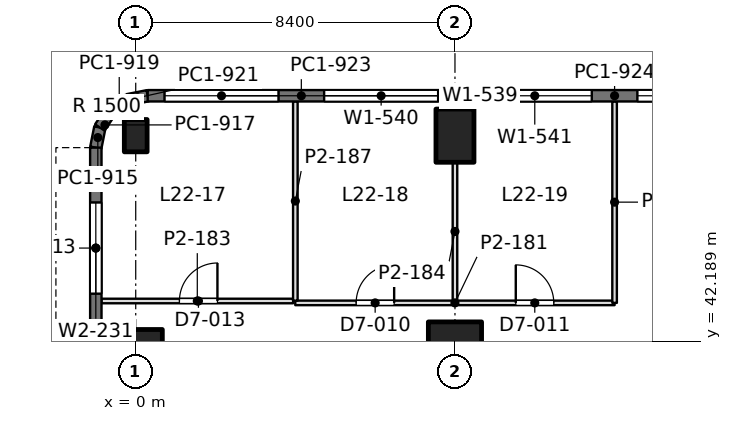
"""IFC4 building model, lengths in metres.
Left out: names, types, materials, properties, quantities, classifications, styles, units other than length and angle.
Written with IfcOpenShell. Run it as: python <this file> out.ifc"""

import sys

from ifc_helpers import new_model, si_unit, direction, frame, frame_2d, origin, origin_2d, place, context, subcontext, project, spatial, rectangle, extrude, element, fill, save


model = new_model("IFC4")
c1 = context("Model", 3, precision=1e-05, world=origin(), true_north=direction((0.0, 1.0)))
c2 = subcontext(c1, "Body", "Model", "MODEL_VIEW")
j1 = project(units=[si_unit("LENGTHUNIT", "METRE"), si_unit("PLANEANGLEUNIT", "RADIAN")], contexts=[c1])
p1 = place(None, origin())
s1 = spatial("IfcSite", under=j1, at=p1, CompositionType="ELEMENT")
p2 = place(p1, origin())
s2 = spatial("IfcBuilding", under=s1, at=p2, CompositionType="ELEMENT")
p3 = place(p2, frame((0.0, 0.0, 100.8)))
s3 = spatial("IfcBuildingStorey", under=s2, at=p3, CompositionType="ELEMENT", Elevation=100.8)
p4 = place(p3, frame((0.0, 42.0, 0.0), z_axis=(0.0, 0.0, 1.0), x_axis=(0.0, 1.0, 0.0)))
e1 = element("IfcColumn", 1, at=p4, inside=s3, PredefinedType="COLUMN", context=c2, shape_type="SweptSolid", body=[
    extrude(rectangle(XDim=1.0, YDim=1.4, at=origin_2d()), origin(), (0.0, 0.0, 1.0), 4.2),
])
p5 = place(p3, frame((0.0, 47.6, 0.0), z_axis=(0.0, 0.0, 1.0), x_axis=(1.0, 0.0, 0.0)))
e2 = element("IfcColumn", 2, at=p5, inside=s3, PredefinedType="COLUMN", context=c2, shape_type="SweptSolid", body=[
    extrude(rectangle(XDim=0.6, YDim=0.85, at=origin_2d()), origin(), (0.0, 0.0, 1.0), 4.2),
])
p6 = place(p3, frame((8.4, 42.0, 0.0), z_axis=(0.0, 0.0, 1.0), x_axis=(1.0, 0.0, 0.0)))
e3 = element("IfcColumn", 3, at=p6, inside=s3, PredefinedType="COLUMN", context=c2, shape_type="SweptSolid", body=[
    extrude(rectangle(XDim=1.4, YDim=1.4, at=origin_2d()), origin(), (0.0, 0.0, 1.0), 4.2),
])
p7 = place(p3, frame((8.4, 47.6, 0.0), z_axis=(0.0, 0.0, 1.0), x_axis=(1.0, 0.0, 0.0)))
e4 = element("IfcColumn", 4, at=p7, inside=s3, PredefinedType="COLUMN", context=c2, shape_type="SweptSolid", body=[
    extrude(rectangle(XDim=1.0, YDim=1.4, at=origin_2d()), origin(), (0.0, 0.0, 1.0), 4.2),
])
p8 = place(p3, frame((-1.05, 42.0, 0.0), z_axis=(0.0, 0.0, 1.0), x_axis=(0.0, 1.0, 0.0)))
e5 = element("IfcWall", 5, at=p8, inside=s3, PredefinedType="SOLIDWALL", context=c2, shape_type="SweptSolid", body=[
    extrude(rectangle(XDim=5.285, YDim=0.3, at=frame_2d((2.643, 0.0))), origin(), (0.0, 0.0, 1.0), 4.05),
])
p9 = place(p8, frame((1.443, 0.0, 0.9)))
e6 = element("IfcOpeningElement", 6, at=p9, cuts=e5, PredefinedType="OPENING", context=c2, shape_type="SweptSolid", body=[
    extrude(rectangle(XDim=2.4, YDim=1.9, at=frame_2d((1.2, 0.95))), frame((0.0, 0.16, 0.0), z_axis=(0.0, -1.0, 0.0), x_axis=(1.0, 0.0, 0.0)), (0.0, 0.0, 1.0), 0.32),
])
p10 = place(p3, frame((-1.05, 47.285, 0.0), z_axis=(0.0, 0.0, 1.0), x_axis=(0.195073962632, 0.980788534345, 0.0)))
e7 = element("IfcWall", 7, at=p10, inside=s3, PredefinedType="SOLIDWALL", context=c2, shape_type="SweptSolid", body=[
    extrude(rectangle(XDim=0.541, YDim=0.3, at=frame_2d((0.271, 0.0))), origin(), (0.0, 0.0, 1.0), 4.05),
])
p11 = place(p3, frame((-0.945, 47.815, 0.0), z_axis=(0.0, 0.0, 1.0), x_axis=(0.55534295404, 0.831621430339, 0.0)))
e8 = element("IfcWall", 8, at=p11, inside=s3, PredefinedType="SOLIDWALL", context=c2, shape_type="SweptSolid", body=[
    extrude(rectangle(XDim=0.526, YDim=0.3, at=frame_2d((0.263, 0.0))), origin(), (0.0, 0.0, 1.0), 4.05),
])
p12 = place(p3, frame((-0.653, 48.253, 0.0), z_axis=(0.0, 0.0, 1.0), x_axis=(0.831692711774, 0.555236195849, 0.0)))
e9 = element("IfcWall", 9, at=p12, inside=s3, PredefinedType="SOLIDWALL", context=c2, shape_type="SweptSolid", body=[
    extrude(rectangle(XDim=0.525, YDim=0.3, at=frame_2d((0.263, 0.0))), origin(), (0.0, 0.0, 1.0), 4.05),
])
p13 = place(p3, frame((-0.216, 48.544, 0.0), z_axis=(0.0, 0.0, 1.0), x_axis=(0.980788534345, 0.195073962632, 0.0)))
e10 = element("IfcWall", 10, at=p13, inside=s3, PredefinedType="SOLIDWALL", context=c2, shape_type="SweptSolid", body=[
    extrude(rectangle(XDim=0.541, YDim=0.3, at=frame_2d((0.271, 0.0))), origin(), (0.0, 0.0, 1.0), 4.05),
])
p14 = place(p3, frame((0.315, 48.65, 0.0), z_axis=(0.0, 0.0, 1.0), x_axis=(1.0, 0.0, 0.0)))
e11 = element("IfcWall", 11, at=p14, inside=s3, PredefinedType="SOLIDWALL", context=c2, shape_type="SweptSolid", body=[
    extrude(rectangle(XDim=8.085, YDim=0.3, at=frame_2d((4.042, 0.0))), origin(), (0.0, 0.0, 1.0), 4.05),
])
p15 = place(p14, frame((0.443, 0.0, 0.9)))
e12 = element("IfcOpeningElement", 12, at=p15, cuts=e11, PredefinedType="OPENING", context=c2, shape_type="SweptSolid", body=[
    extrude(rectangle(XDim=3.0, YDim=1.9, at=frame_2d((1.5, 0.95))), frame((0.0, 0.16, 0.0), z_axis=(0.0, -1.0, 0.0), x_axis=(1.0, 0.0, 0.0)), (0.0, 0.0, 1.0), 0.32),
])
p16 = place(p14, frame((4.643, 0.0, 0.9)))
e13 = element("IfcOpeningElement", 13, at=p16, cuts=e11, PredefinedType="OPENING", context=c2, shape_type="SweptSolid", body=[
    extrude(rectangle(XDim=3.0, YDim=1.9, at=frame_2d((1.5, 0.95))), frame((0.0, 0.16, 0.0), z_axis=(0.0, -1.0, 0.0), x_axis=(1.0, 0.0, 0.0)), (0.0, 0.0, 1.0), 0.32),
])
p17 = place(p3, frame((8.4, 48.65, 0.0), z_axis=(0.0, 0.0, 1.0), x_axis=(1.0, 0.0, 0.0)))
e14 = element("IfcWall", 14, at=p17, inside=s3, PredefinedType="SOLIDWALL", context=c2, shape_type="SweptSolid", body=[
    extrude(rectangle(XDim=8.4, YDim=0.3, at=frame_2d((4.2, 0.0))), origin(), (0.0, 0.0, 1.0), 4.05),
])
p18 = place(p17, frame((0.6, 0.0, 0.9)))
e15 = element("IfcOpeningElement", 15, at=p18, cuts=e14, PredefinedType="OPENING", context=c2, shape_type="SweptSolid", body=[
    extrude(rectangle(XDim=3.0, YDim=1.9, at=frame_2d((1.5, 0.95))), frame((0.0, 0.16, 0.0), z_axis=(0.0, -1.0, 0.0), x_axis=(1.0, 0.0, 0.0)), (0.0, 0.0, 1.0), 0.32),
])
p19 = place(p17, frame((4.8, 0.0, 0.9)))
e16 = element("IfcOpeningElement", 16, at=p19, cuts=e14, PredefinedType="OPENING", context=c2, shape_type="SweptSolid", body=[
    extrude(rectangle(XDim=3.0, YDim=1.9, at=frame_2d((1.5, 0.95))), frame((0.0, 0.16, 0.0), z_axis=(0.0, -1.0, 0.0), x_axis=(1.0, 0.0, 0.0)), (0.0, 0.0, 1.0), 0.32),
])
p20 = place(p3, frame((-0.902, 43.25, 0.0), z_axis=(0.0, 0.0, 1.0), x_axis=(1.0, 0.0, 0.0)))
e17 = element("IfcWall", 17, at=p20, inside=s3, PredefinedType="PARTITIONING", context=c2, shape_type="SweptSolid", body=[
    extrude(rectangle(XDim=5.044, YDim=0.12, at=frame_2d((2.522, 0.0))), origin(), (0.0, 0.0, 1.0), 3.56),
])
p21 = place(p20, frame((2.052, 0.0, 0.0)))
e18 = element("IfcOpeningElement", 18, at=p21, cuts=e17, PredefinedType="OPENING", context=c2, shape_type="SweptSolid", body=[
    extrude(rectangle(XDim=1.0, YDim=2.4, at=frame_2d((0.5, 1.2))), frame((0.0, 0.07, 0.0), z_axis=(0.0, -1.0, 0.0), x_axis=(1.0, 0.0, 0.0)), (0.0, 0.0, 1.0), 0.14),
])
p22 = place(p3, frame((4.198, 43.2, 0.0), z_axis=(0.0, 0.0, 1.0), x_axis=(1.0, 0.0, 0.0)))
e19 = element("IfcWall", 19, at=p22, inside=s3, PredefinedType="PARTITIONING", context=c2, shape_type="SweptSolid", body=[
    extrude(rectangle(XDim=8.402, YDim=0.12, at=frame_2d((4.201, 0.0))), origin(), (0.0, 0.0, 1.0), 3.55),
])
p23 = place(p22, frame((1.602, 0.0, 0.0)))
e20 = element("IfcOpeningElement", 20, at=p23, cuts=e19, PredefinedType="OPENING", context=c2, shape_type="SweptSolid", body=[
    extrude(rectangle(XDim=1.0, YDim=2.4, at=frame_2d((0.5, 1.2))), frame((0.0, 0.07, 0.0), z_axis=(0.0, -1.0, 0.0), x_axis=(1.0, 0.0, 0.0)), (0.0, 0.0, 1.0), 0.14),
])
p24 = place(p22, frame((5.802, 0.0, 0.0)))
e21 = element("IfcOpeningElement", 21, at=p24, cuts=e19, PredefinedType="OPENING", context=c2, shape_type="SweptSolid", body=[
    extrude(rectangle(XDim=1.0, YDim=2.4, at=frame_2d((0.5, 1.2))), frame((0.0, 0.07, 0.0), z_axis=(0.0, -1.0, 0.0), x_axis=(1.0, 0.0, 0.0)), (0.0, 0.0, 1.0), 0.14),
])
p25 = place(p3, frame((4.2, 43.258, 0.0), z_axis=(0.0, 0.0, 1.0), x_axis=(0.0, 1.0, 0.0)))
e22 = element("IfcWall", 22, at=p25, inside=s3, PredefinedType="PARTITIONING", context=c2, shape_type="SweptSolid", body=[
    extrude(rectangle(XDim=5.244, YDim=0.12, at=frame_2d((2.622, 0.0))), origin(), (0.0, 0.0, 1.0), 3.56),
])
p26 = place(p3, frame((8.4, 43.258, 0.0), z_axis=(0.0, 0.0, 1.0), x_axis=(0.0, 1.0, 0.0)))
e23 = element("IfcWall", 23, at=p26, inside=s3, PredefinedType="PARTITIONING", context=c2, shape_type="SweptSolid", body=[
    extrude(rectangle(XDim=3.643, YDim=0.12, at=frame_2d((1.821, 0.0))), origin(), (0.0, 0.0, 1.0), 3.55),
])
p27 = place(p3, frame((12.6, 43.2, 0.0), z_axis=(0.0, 0.0, 1.0), x_axis=(0.0, 1.0, 0.0)))
e24 = element("IfcWall", 24, at=p27, inside=s3, PredefinedType="PARTITIONING", context=c2, shape_type="SweptSolid", body=[
    extrude(rectangle(XDim=5.302, YDim=0.12, at=frame_2d((2.651, 0.0))), origin(), (0.0, 0.0, 1.0), 3.56),
])
p28 = place(p9, origin())
e25 = element("IfcWindow", 25, at=p28, inside=s3, PartitioningType="SINGLE_PANEL", PredefinedType="WINDOW", context=c2, shape_type="SweptSolid", body=[
    extrude(rectangle(XDim=2.4, YDim=1.9, at=frame_2d((1.2, 0.95))), frame((0.0, 0.03, 0.0), z_axis=(0.0, -1.0, 0.0), x_axis=(1.0, 0.0, 0.0)), (0.0, 0.0, 1.0), 0.06),
])
fill(e6, e25)
p29 = place(p15, origin())
e26 = element("IfcWindow", 26, at=p29, inside=s3, PartitioningType="SINGLE_PANEL", PredefinedType="WINDOW", context=c2, shape_type="SweptSolid", body=[
    extrude(rectangle(XDim=3.0, YDim=1.9, at=frame_2d((1.5, 0.95))), frame((0.0, 0.03, 0.0), z_axis=(0.0, -1.0, 0.0), x_axis=(1.0, 0.0, 0.0)), (0.0, 0.0, 1.0), 0.06),
])
fill(e12, e26)
p30 = place(p16, origin())
e27 = element("IfcWindow", 27, at=p30, inside=s3, PartitioningType="SINGLE_PANEL", PredefinedType="WINDOW", context=c2, shape_type="SweptSolid", body=[
    extrude(rectangle(XDim=3.0, YDim=1.9, at=frame_2d((1.5, 0.95))), frame((0.0, 0.03, 0.0), z_axis=(0.0, -1.0, 0.0), x_axis=(1.0, 0.0, 0.0)), (0.0, 0.0, 1.0), 0.06),
])
fill(e13, e27)
p31 = place(p18, origin())
e28 = element("IfcWindow", 28, at=p31, inside=s3, PartitioningType="SINGLE_PANEL", PredefinedType="WINDOW", context=c2, shape_type="SweptSolid", body=[
    extrude(rectangle(XDim=3.0, YDim=1.9, at=frame_2d((1.5, 0.95))), frame((0.0, 0.03, 0.0), z_axis=(0.0, -1.0, 0.0), x_axis=(1.0, 0.0, 0.0)), (0.0, 0.0, 1.0), 0.06),
])
fill(e15, e28)
p32 = place(p19, origin())
e29 = element("IfcWindow", 29, at=p32, inside=s3, PartitioningType="SINGLE_PANEL", PredefinedType="WINDOW", context=c2, shape_type="SweptSolid", body=[
    extrude(rectangle(XDim=3.0, YDim=1.9, at=frame_2d((1.5, 0.95))), frame((0.0, 0.03, 0.0), z_axis=(0.0, -1.0, 0.0), x_axis=(1.0, 0.0, 0.0)), (0.0, 0.0, 1.0), 0.06),
])
fill(e16, e29)
p33 = place(p21, origin())
e30 = element("IfcDoor", 30, at=p33, inside=s3, OperationType="SINGLE_SWING_RIGHT", PredefinedType="DOOR", context=c2, shape_type="SweptSolid", body=[
    extrude(rectangle(XDim=1.0, YDim=2.4, at=frame_2d((0.5, 1.2))), frame((0.0, 0.025, 0.0), z_axis=(0.0, -1.0, 0.0), x_axis=(1.0, 0.0, 0.0)), (0.0, 0.0, 1.0), 0.05),
])
fill(e18, e30)
p34 = place(p23, origin())
e31 = element("IfcDoor", 31, at=p34, inside=s3, OperationType="SINGLE_SWING_RIGHT", PredefinedType="DOOR", context=c2, shape_type="SweptSolid", body=[
    extrude(rectangle(XDim=1.0, YDim=2.4, at=frame_2d((0.5, 1.2))), frame((0.0, 0.025, 0.0), z_axis=(0.0, -1.0, 0.0), x_axis=(1.0, 0.0, 0.0)), (0.0, 0.0, 1.0), 0.05),
])
fill(e20, e31)
p35 = place(p24, origin())
e32 = element("IfcDoor", 32, at=p35, inside=s3, OperationType="SINGLE_SWING_LEFT", PredefinedType="DOOR", context=c2, shape_type="SweptSolid", body=[
    extrude(rectangle(XDim=1.0, YDim=2.4, at=frame_2d((0.5, 1.2))), frame((0.0, 0.025, 0.0), z_axis=(0.0, -1.0, 0.0), x_axis=(1.0, 0.0, 0.0)), (0.0, 0.0, 1.0), 0.05),
])
fill(e21, e32)
save(model, sys.argv[1])
